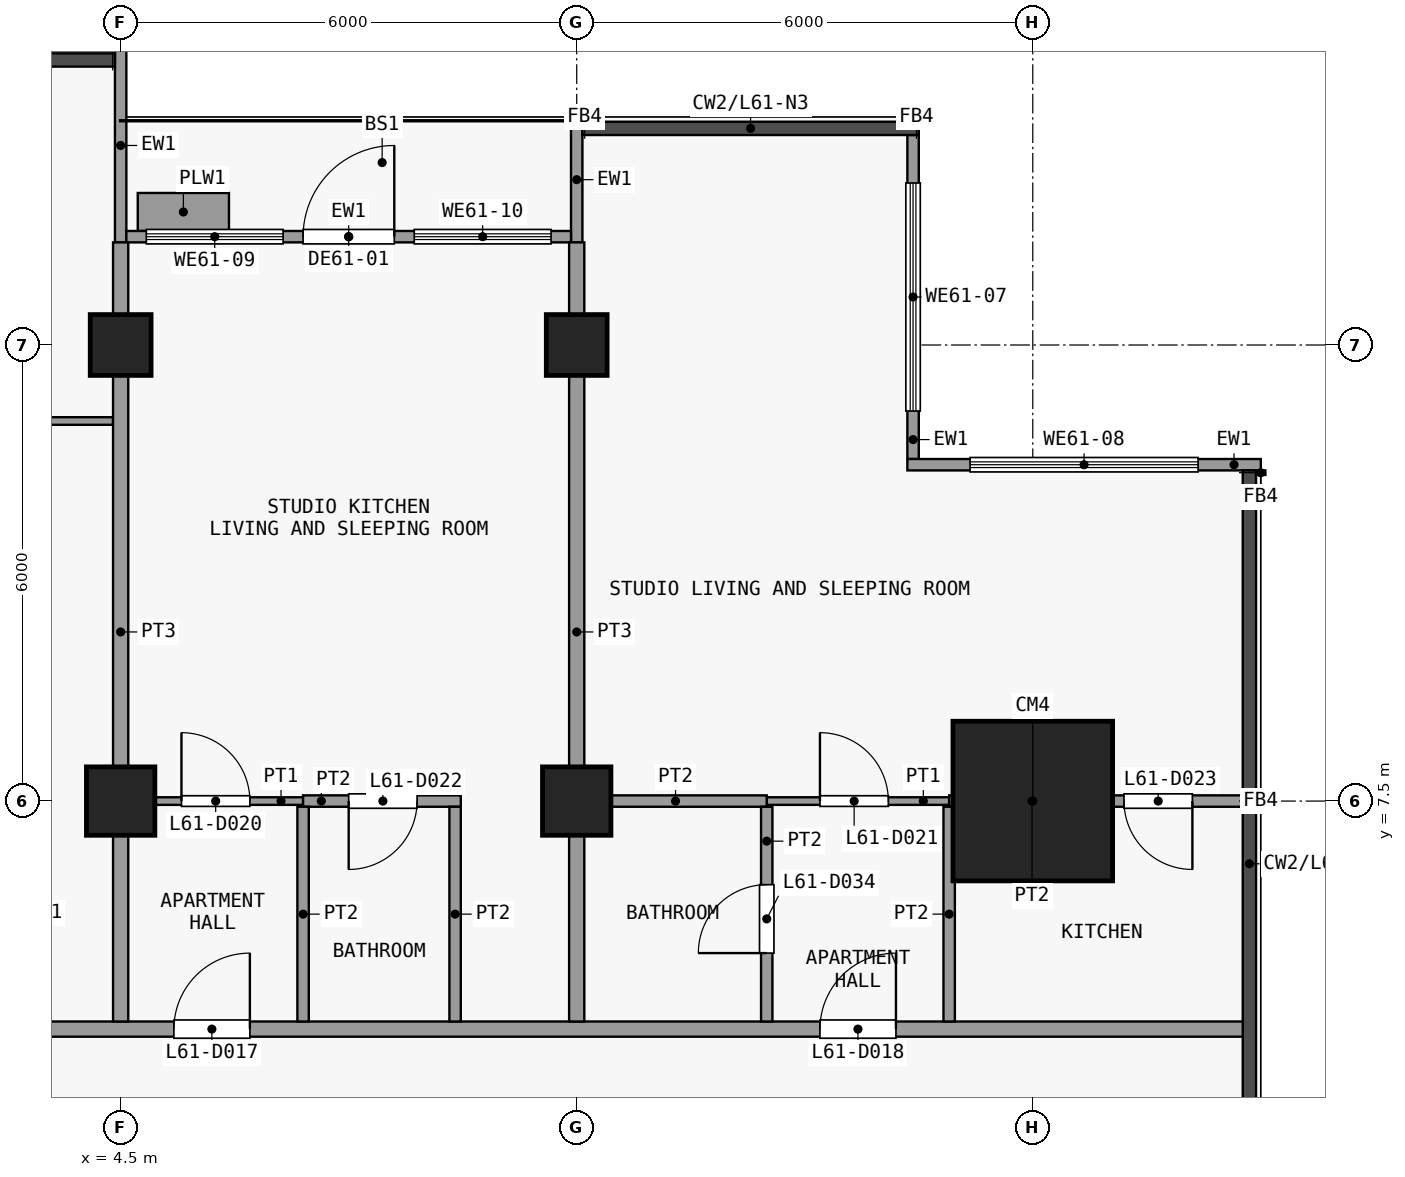
"""IFC4 building model, lengths in metres.
Left out: names, types, materials, properties, quantities, classifications, styles, units other than length and angle.
Written with IfcOpenShell. Run it as: python <this file> out.ifc"""

import sys

from ifc_helpers import new_model, si_unit, direction, frame, frame_2d, origin, origin_2d, place, context, subcontext, project, spatial, rectangle, extrude, element, fill, save


model = new_model("IFC4")
c1 = context("Model", 3, precision=1e-05, world=origin(), true_north=direction((0.0, 1.0)))
c2 = subcontext(c1, "Body", "Model", "MODEL_VIEW")
j1 = project(units=[si_unit("LENGTHUNIT", "METRE"), si_unit("PLANEANGLEUNIT", "RADIAN")], contexts=[c1])
p1 = place(None, origin())
s1 = spatial("IfcSite", under=j1, at=p1, CompositionType="ELEMENT")
p2 = place(p1, origin())
s2 = spatial("IfcBuilding", under=s1, at=p2, CompositionType="ELEMENT")
p3 = place(p2, frame((0.0, 0.0, 241.1)))
s3 = spatial("IfcBuildingStorey", under=s2, at=p3, CompositionType="ELEMENT", Elevation=241.1)
p4 = place(p3, frame((4.5, 7.5, 0.0), z_axis=(0.0, 0.0, 1.0), x_axis=(1.0, 0.0, 0.0)))
e1 = element("IfcColumn", 1, at=p4, inside=s3, PredefinedType="COLUMN", context=c2, shape_type="SweptSolid", body=[
    extrude(rectangle(XDim=0.9, YDim=0.9, at=origin_2d()), origin(), (0.0, 0.0, 1.0), 3.6),
])
p5 = place(p3, frame((4.5, 13.5, 0.0), z_axis=(0.0, 0.0, 1.0), x_axis=(1.0, 0.0, 0.0)))
e2 = element("IfcColumn", 2, at=p5, inside=s3, PredefinedType="COLUMN", context=c2, shape_type="SweptSolid", body=[
    extrude(rectangle(XDim=0.8, YDim=0.8, at=origin_2d()), origin(), (0.0, 0.0, 1.0), 3.6),
])
p6 = place(p3, frame((10.5, 7.5, 0.0), z_axis=(0.0, 0.0, 1.0), x_axis=(1.0, 0.0, 0.0)))
e3 = element("IfcColumn", 3, at=p6, inside=s3, PredefinedType="COLUMN", context=c2, shape_type="SweptSolid", body=[
    extrude(rectangle(XDim=0.9, YDim=0.9, at=origin_2d()), origin(), (0.0, 0.0, 1.0), 3.6),
])
p7 = place(p3, frame((10.5, 13.5, 0.0), z_axis=(0.0, 0.0, 1.0), x_axis=(1.0, 0.0, 0.0)))
e4 = element("IfcColumn", 4, at=p7, inside=s3, PredefinedType="COLUMN", context=c2, shape_type="SweptSolid", body=[
    extrude(rectangle(XDim=0.8, YDim=0.8, at=origin_2d()), origin(), (0.0, 0.0, 1.0), 3.6),
])
p8 = place(p3, frame((16.5, 7.5, 0.0), z_axis=(0.0, 0.0, 1.0), x_axis=(1.0, 0.0, 0.0)))
e5 = element("IfcColumn", 5, at=p8, inside=s3, PredefinedType="COLUMN", context=c2, shape_type="SweptSolid", body=[
    extrude(rectangle(XDim=2.1, YDim=2.1, at=origin_2d()), origin(), (0.0, 0.0, 1.0), 3.6),
])
p9 = place(p3, frame((14.925, 16.262, 0.0), z_axis=(0.0, 0.0, 1.0), x_axis=(0.0, -1.0, 0.0)))
e6 = element("IfcWall", 6, at=p9, inside=s3, PredefinedType="SOLIDWALL", context=c2, shape_type="SweptSolid", body=[
    extrude(rectangle(XDim=4.262, YDim=0.15, at=frame_2d((2.131, 0.0))), origin(), (0.0, 0.0, 1.0), 3.3),
])
p10 = place(p9, frame((0.631, 0.0, 0.9)))
e7 = element("IfcOpeningElement", 7, at=p10, cuts=e6, PredefinedType="OPENING", context=c2, shape_type="SweptSolid", body=[
    extrude(rectangle(XDim=3.0, YDim=2.4, at=frame_2d((1.5, 1.2))), frame((0.0, 0.085, 0.0), z_axis=(0.0, -1.0, 0.0), x_axis=(1.0, 0.0, 0.0)), (0.0, 0.0, 1.0), 0.17),
])
p11 = place(p3, frame((14.85, 11.925, 0.0), z_axis=(0.0, 0.0, 1.0), x_axis=(1.0, 0.0, 0.0)))
e8 = element("IfcWall", 8, at=p11, inside=s3, PredefinedType="SOLIDWALL", context=c2, shape_type="SweptSolid", body=[
    extrude(rectangle(XDim=4.65, YDim=0.15, at=frame_2d((2.325, 0.0))), origin(), (0.0, 0.0, 1.0), 3.3),
])
p12 = place(p11, frame((0.825, 0.0, 0.9)))
e9 = element("IfcOpeningElement", 9, at=p12, cuts=e8, PredefinedType="OPENING", context=c2, shape_type="SweptSolid", body=[
    extrude(rectangle(XDim=3.0, YDim=2.4, at=frame_2d((1.5, 1.2))), frame((0.0, 0.085, 0.0), z_axis=(0.0, -1.0, 0.0), x_axis=(1.0, 0.0, 0.0)), (0.0, 0.0, 1.0), 0.17),
])
p13 = place(p3, frame((4.5, 14.85, 0.0), z_axis=(0.0, 0.0, 1.0), x_axis=(0.0, 1.0, 0.0)))
e10 = element("IfcWall", 10, at=p13, inside=s3, PredefinedType="SOLIDWALL", context=c2, shape_type="SweptSolid", body=[
    extrude(rectangle(XDim=2.55, YDim=0.15, at=frame_2d((1.275, 0.0))), origin(), (0.0, 0.0, 1.0), 3.3),
])
p14 = place(p3, frame((10.5, 14.85, 0.0), z_axis=(0.0, 0.0, 1.0), x_axis=(0.0, 1.0, 0.0)))
e11 = element("IfcWall", 11, at=p14, inside=s3, PredefinedType="SOLIDWALL", context=c2, shape_type="SweptSolid", body=[
    extrude(rectangle(XDim=1.65, YDim=0.15, at=frame_2d((0.825, 0.0))), origin(), (0.0, 0.0, 1.0), 3.3),
])
p15 = place(p3, frame((4.575, 14.925, 0.0), z_axis=(0.0, 0.0, 1.0), x_axis=(1.0, 0.0, 0.0)))
e12 = element("IfcWall", 12, at=p15, inside=s3, PredefinedType="SOLIDWALL", context=c2, shape_type="SweptSolid", body=[
    extrude(rectangle(XDim=5.85, YDim=0.15, at=frame_2d((2.925, 0.0))), origin(), (0.0, 0.0, 1.0), 3.3),
])
p16 = place(p15, frame((2.325, 0.0, 0.0)))
e13 = element("IfcOpeningElement", 13, at=p16, cuts=e12, PredefinedType="OPENING", context=c2, shape_type="SweptSolid", body=[
    extrude(rectangle(XDim=1.2, YDim=2.4, at=frame_2d((0.6, 1.2))), frame((0.0, 0.085, 0.0), z_axis=(0.0, -1.0, 0.0), x_axis=(1.0, 0.0, 0.0)), (0.0, 0.0, 1.0), 0.17),
])
p17 = place(p15, frame((0.262, 0.0, 0.9)))
e14 = element("IfcOpeningElement", 14, at=p17, cuts=e12, PredefinedType="OPENING", context=c2, shape_type="SweptSolid", body=[
    extrude(rectangle(XDim=1.8, YDim=2.1, at=frame_2d((0.9, 1.05))), frame((0.0, 0.085, 0.0), z_axis=(0.0, -1.0, 0.0), x_axis=(1.0, 0.0, 0.0)), (0.0, 0.0, 1.0), 0.17),
])
p18 = place(p15, frame((3.788, 0.0, 0.9)))
e15 = element("IfcOpeningElement", 15, at=p18, cuts=e12, PredefinedType="OPENING", context=c2, shape_type="SweptSolid", body=[
    extrude(rectangle(XDim=1.8, YDim=2.1, at=frame_2d((0.9, 1.05))), frame((0.0, 0.085, 0.0), z_axis=(0.0, -1.0, 0.0), x_axis=(1.0, 0.0, 0.0)), (0.0, 0.0, 1.0), 0.17),
])
p19 = place(p3, frame((4.725, 15.25, 0.0), z_axis=(0.0, 0.0, 1.0), x_axis=(1.0, 0.0, 0.0)))
e16 = element("IfcWall", 16, at=p19, inside=s3, PredefinedType="USERDEFINED", context=c2, shape_type="SweptSolid", body=[
    extrude(rectangle(XDim=1.2, YDim=0.5, at=frame_2d((0.6, 0.0))), origin(), (0.0, 0.0, 1.0), 0.9),
])
p20 = place(p3, frame((-19.35, 4.5, 0.0), z_axis=(0.0, 0.0, 1.0), x_axis=(1.0, 0.0, 0.0)))
e17 = element("IfcWall", 17, at=p20, inside=s3, PredefinedType="PARTITIONING", context=c2, shape_type="SweptSolid", body=[
    extrude(rectangle(XDim=38.7, YDim=0.2, at=frame_2d((19.35, 0.0))), origin(), (0.0, 0.0, 1.0), 3.3),
])
p21 = place(p20, frame((13.05, 0.0, 0.0)))
e18 = element("IfcOpeningElement", 18, at=p21, cuts=e17, PredefinedType="OPENING", context=c2, shape_type="SweptSolid", body=[
    extrude(rectangle(XDim=1.0, YDim=2.1, at=frame_2d((0.5, 1.05))), frame((0.0, 0.11, 0.0), z_axis=(0.0, -1.0, 0.0), x_axis=(1.0, 0.0, 0.0)), (0.0, 0.0, 1.0), 0.22),
])
p22 = place(p20, frame((24.55, 0.0, 0.0)))
e19 = element("IfcOpeningElement", 19, at=p22, cuts=e17, PredefinedType="OPENING", context=c2, shape_type="SweptSolid", body=[
    extrude(rectangle(XDim=1.0, YDim=2.1, at=frame_2d((0.5, 1.05))), frame((0.0, 0.11, 0.0), z_axis=(0.0, -1.0, 0.0), x_axis=(1.0, 0.0, 0.0)), (0.0, 0.0, 1.0), 0.22),
])
p23 = place(p20, frame((33.05, 0.0, 0.0)))
e20 = element("IfcOpeningElement", 20, at=p23, cuts=e17, PredefinedType="OPENING", context=c2, shape_type="SweptSolid", body=[
    extrude(rectangle(XDim=1.0, YDim=2.1, at=frame_2d((0.5, 1.05))), frame((0.0, 0.11, 0.0), z_axis=(0.0, -1.0, 0.0), x_axis=(1.0, 0.0, 0.0)), (0.0, 0.0, 1.0), 0.22),
])
p24 = place(p3, frame((4.6, 7.5, 0.0), z_axis=(0.0, 0.0, 1.0), x_axis=(1.0, 0.0, 0.0)))
e21 = element("IfcWall", 21, at=p24, inside=s3, PredefinedType="PARTITIONING", context=c2, shape_type="SweptSolid", body=[
    extrude(rectangle(XDim=2.3, YDim=0.1, at=frame_2d((1.15, 0.0))), origin(), (0.0, 0.0, 1.0), 3.3),
])
p25 = place(p24, frame((0.7, 0.0, 0.0)))
e22 = element("IfcOpeningElement", 22, at=p25, cuts=e21, PredefinedType="OPENING", context=c2, shape_type="SweptSolid", body=[
    extrude(rectangle(XDim=0.9, YDim=2.1, at=frame_2d((0.45, 1.05))), frame((0.0, 0.06, 0.0), z_axis=(0.0, -1.0, 0.0), x_axis=(1.0, 0.0, 0.0)), (0.0, 0.0, 1.0), 0.12),
])
p26 = place(p3, frame((13.0, 7.5, 0.0), z_axis=(0.0, 0.0, 1.0), x_axis=(1.0, 0.0, 0.0)))
e23 = element("IfcWall", 23, at=p26, inside=s3, PredefinedType="PARTITIONING", context=c2, shape_type="SweptSolid", body=[
    extrude(rectangle(XDim=2.4, YDim=0.1, at=frame_2d((1.2, 0.0))), origin(), (0.0, 0.0, 1.0), 3.3),
])
p27 = place(p26, frame((0.7, 0.0, 0.0)))
e24 = element("IfcOpeningElement", 24, at=p27, cuts=e23, PredefinedType="OPENING", context=c2, shape_type="SweptSolid", body=[
    extrude(rectangle(XDim=0.9, YDim=2.1, at=frame_2d((0.45, 1.05))), frame((0.0, 0.06, 0.0), z_axis=(0.0, -1.0, 0.0), x_axis=(1.0, 0.0, 0.0)), (0.0, 0.0, 1.0), 0.12),
])
p28 = place(p3, frame((6.9, 7.5, 0.0), z_axis=(0.0, 0.0, 1.0), x_axis=(1.0, 0.0, 0.0)))
e25 = element("IfcWall", 25, at=p28, inside=s3, PredefinedType="PARTITIONING", context=c2, shape_type="SweptSolid", body=[
    extrude(rectangle(XDim=2.075, YDim=0.15, at=frame_2d((1.038, 0.0))), origin(), (0.0, 0.0, 1.0), 3.3),
])
p29 = place(p28, frame((0.6, 0.0, 0.0)))
e26 = element("IfcOpeningElement", 26, at=p29, cuts=e25, PredefinedType="OPENING", context=c2, shape_type="SweptSolid", body=[
    extrude(rectangle(XDim=0.9, YDim=2.1, at=frame_2d((0.45, 1.05))), frame((0.0, 0.085, 0.0), z_axis=(0.0, -1.0, 0.0), x_axis=(1.0, 0.0, 0.0)), (0.0, 0.0, 1.0), 0.17),
])
p30 = place(p3, frame((10.6, 7.5, 0.0), z_axis=(0.0, 0.0, 1.0), x_axis=(1.0, 0.0, 0.0)))
e27 = element("IfcWall", 27, at=p30, inside=s3, PredefinedType="PARTITIONING", context=c2, shape_type="SweptSolid", body=[
    extrude(rectangle(XDim=2.4, YDim=0.15, at=frame_2d((1.2, 0.0))), origin(), (0.0, 0.0, 1.0), 3.3),
])
p31 = place(p3, frame((15.4, 7.5, 0.0), z_axis=(0.0, 0.0, 1.0), x_axis=(1.0, 0.0, 0.0)))
e28 = element("IfcWall", 28, at=p31, inside=s3, PredefinedType="PARTITIONING", context=c2, shape_type="SweptSolid", body=[
    extrude(rectangle(XDim=3.863, YDim=0.15, at=frame_2d((1.931, 0.0))), origin(), (0.0, 0.0, 1.0), 3.3),
])
p32 = place(p31, frame((2.3, 0.0, 0.0)))
e29 = element("IfcOpeningElement", 29, at=p32, cuts=e28, PredefinedType="OPENING", context=c2, shape_type="SweptSolid", body=[
    extrude(rectangle(XDim=0.9, YDim=2.1, at=frame_2d((0.45, 1.05))), frame((0.0, 0.085, 0.0), z_axis=(0.0, -1.0, 0.0), x_axis=(1.0, 0.0, 0.0)), (0.0, 0.0, 1.0), 0.17),
])
p33 = place(p3, frame((-4.45, 12.5, 0.0), z_axis=(0.0, 0.0, 1.0), x_axis=(1.0, 0.0, 0.0)))
e30 = element("IfcWall", 30, at=p33, inside=s3, PredefinedType="PARTITIONING", context=c2, shape_type="SweptSolid", body=[
    extrude(rectangle(XDim=8.85, YDim=0.1, at=frame_2d((4.425, 0.0))), origin(), (0.0, 0.0, 1.0), 3.3),
])
p34 = place(p33, frame((4.0, 0.0, 0.0)))
e31 = element("IfcOpeningElement", 31, at=p34, cuts=e30, PredefinedType="OPENING", context=c2, shape_type="SweptSolid", body=[
    extrude(rectangle(XDim=0.9, YDim=2.1, at=frame_2d((0.45, 1.05))), frame((0.0, 0.06, 0.0), z_axis=(0.0, -1.0, 0.0), x_axis=(1.0, 0.0, 0.0)), (0.0, 0.0, 1.0), 0.12),
])
p35 = place(p3, frame((4.5, 4.6, 0.0), z_axis=(0.0, 0.0, 1.0), x_axis=(0.0, 1.0, 0.0)))
e32 = element("IfcWall", 32, at=p35, inside=s3, PredefinedType="PARTITIONING", context=c2, shape_type="SweptSolid", body=[
    extrude(rectangle(XDim=10.25, YDim=0.2, at=frame_2d((5.125, 0.0))), origin(), (0.0, 0.0, 1.0), 3.3),
])
for number, where, z_axis, x_axis in (
    (33, (6.9, 4.6, 0.0), (0.0, 0.0, 1.0), (0.0, 1.0, 0.0)),
    (34, (8.9, 4.6, 0.0), (0.0, 0.0, 1.0), (0.0, 1.0, 0.0)),
):
    element("IfcWall", number, at=place(p3, frame(where, z_axis=z_axis, x_axis=x_axis)), inside=s3, PredefinedType="PARTITIONING", context=c2, shape_type="SweptSolid", body=[
        extrude(rectangle(XDim=2.825, YDim=0.15, at=frame_2d((1.413, 0.0))), origin(), (0.0, 0.0, 1.0), 3.3),
    ])
p36 = place(p3, frame((10.5, 4.6, 0.0), z_axis=(0.0, 0.0, 1.0), x_axis=(0.0, 1.0, 0.0)))
e35 = element("IfcWall", 35, at=p36, inside=s3, PredefinedType="PARTITIONING", context=c2, shape_type="SweptSolid", body=[
    extrude(rectangle(XDim=10.25, YDim=0.2, at=frame_2d((5.125, 0.0))), origin(), (0.0, 0.0, 1.0), 3.3),
])
p37 = place(p3, frame((13.0, 4.6, 0.0), z_axis=(0.0, 0.0, 1.0), x_axis=(0.0, 1.0, 0.0)))
e36 = element("IfcWall", 36, at=p37, inside=s3, PredefinedType="PARTITIONING", context=c2, shape_type="SweptSolid", body=[
    extrude(rectangle(XDim=2.825, YDim=0.15, at=frame_2d((1.413, 0.0))), origin(), (0.0, 0.0, 1.0), 3.3),
])
p38 = place(p37, frame((0.9, 0.0, 0.0)))
e37 = element("IfcOpeningElement", 37, at=p38, cuts=e36, PredefinedType="OPENING", context=c2, shape_type="SweptSolid", body=[
    extrude(rectangle(XDim=0.9, YDim=2.1, at=frame_2d((0.45, 1.05))), frame((0.0, 0.085, 0.0), z_axis=(0.0, -1.0, 0.0), x_axis=(1.0, 0.0, 0.0)), (0.0, 0.0, 1.0), 0.17),
])
p39 = place(p3, frame((15.4, 4.6, 0.0), z_axis=(0.0, 0.0, 1.0), x_axis=(0.0, 1.0, 0.0)))
e38 = element("IfcWall", 38, at=p39, inside=s3, PredefinedType="PARTITIONING", context=c2, shape_type="SweptSolid", body=[
    extrude(rectangle(XDim=2.825, YDim=0.15, at=frame_2d((1.413, 0.0))), origin(), (0.0, 0.0, 1.0), 3.3),
])
p40 = place(p10, origin())
e39 = element("IfcWindow", 39, at=p40, inside=s3, PartitioningType="SINGLE_PANEL", PredefinedType="WINDOW", context=c2, shape_type="SweptSolid", body=[
    extrude(rectangle(XDim=3.0, YDim=2.4, at=frame_2d((1.5, 1.2))), frame((0.0, 0.03, 0.0), z_axis=(0.0, -1.0, 0.0), x_axis=(1.0, 0.0, 0.0)), (0.0, 0.0, 1.0), 0.06),
])
fill(e7, e39)
p41 = place(p12, origin())
e40 = element("IfcWindow", 40, at=p41, inside=s3, PartitioningType="SINGLE_PANEL", PredefinedType="WINDOW", context=c2, shape_type="SweptSolid", body=[
    extrude(rectangle(XDim=3.0, YDim=2.4, at=frame_2d((1.5, 1.2))), frame((0.0, 0.03, 0.0), z_axis=(0.0, -1.0, 0.0), x_axis=(1.0, 0.0, 0.0)), (0.0, 0.0, 1.0), 0.06),
])
fill(e9, e40)
p42 = place(p16, origin())
e41 = element("IfcDoor", 41, at=p42, inside=s3, OperationType="SINGLE_SWING_RIGHT", PredefinedType="DOOR", context=c2, shape_type="SweptSolid", body=[
    extrude(rectangle(XDim=1.2, YDim=2.4, at=frame_2d((0.6, 1.2))), frame((0.0, 0.025, 0.0), z_axis=(0.0, -1.0, 0.0), x_axis=(1.0, 0.0, 0.0)), (0.0, 0.0, 1.0), 0.05),
])
fill(e13, e41)
p43 = place(p17, origin())
e42 = element("IfcWindow", 42, at=p43, inside=s3, PartitioningType="SINGLE_PANEL", PredefinedType="WINDOW", context=c2, shape_type="SweptSolid", body=[
    extrude(rectangle(XDim=1.8, YDim=2.1, at=frame_2d((0.9, 1.05))), frame((0.0, 0.03, 0.0), z_axis=(0.0, -1.0, 0.0), x_axis=(1.0, 0.0, 0.0)), (0.0, 0.0, 1.0), 0.06),
])
fill(e14, e42)
p44 = place(p18, origin())
e43 = element("IfcWindow", 43, at=p44, inside=s3, PartitioningType="SINGLE_PANEL", PredefinedType="WINDOW", context=c2, shape_type="SweptSolid", body=[
    extrude(rectangle(XDim=1.8, YDim=2.1, at=frame_2d((0.9, 1.05))), frame((0.0, 0.03, 0.0), z_axis=(0.0, -1.0, 0.0), x_axis=(1.0, 0.0, 0.0)), (0.0, 0.0, 1.0), 0.06),
])
fill(e15, e43)
p45 = place(p22, origin())
e44 = element("IfcDoor", 44, at=p45, inside=s3, OperationType="SINGLE_SWING_LEFT", PredefinedType="DOOR", context=c2, shape_type="SweptSolid", body=[
    extrude(rectangle(XDim=1.0, YDim=2.1, at=frame_2d((0.5, 1.05))), frame((0.0, 0.025, 0.0), z_axis=(0.0, -1.0, 0.0), x_axis=(1.0, 0.0, 0.0)), (0.0, 0.0, 1.0), 0.05),
])
fill(e19, e44)
p46 = place(p23, origin())
e45 = element("IfcDoor", 45, at=p46, inside=s3, OperationType="SINGLE_SWING_LEFT", PredefinedType="DOOR", context=c2, shape_type="SweptSolid", body=[
    extrude(rectangle(XDim=1.0, YDim=2.1, at=frame_2d((0.5, 1.05))), frame((0.0, 0.025, 0.0), z_axis=(0.0, -1.0, 0.0), x_axis=(1.0, 0.0, 0.0)), (0.0, 0.0, 1.0), 0.05),
])
fill(e20, e45)
p47 = place(p25, origin())
e46 = element("IfcDoor", 46, at=p47, inside=s3, OperationType="SINGLE_SWING_RIGHT", PredefinedType="DOOR", context=c2, shape_type="SweptSolid", body=[
    extrude(rectangle(XDim=0.9, YDim=2.1, at=frame_2d((0.45, 1.05))), frame((0.0, 0.025, 0.0), z_axis=(0.0, -1.0, 0.0), x_axis=(1.0, 0.0, 0.0)), (0.0, 0.0, 1.0), 0.05),
])
fill(e22, e46)
p48 = place(p27, origin())
e47 = element("IfcDoor", 47, at=p48, inside=s3, OperationType="SINGLE_SWING_RIGHT", PredefinedType="DOOR", context=c2, shape_type="SweptSolid", body=[
    extrude(rectangle(XDim=0.9, YDim=2.1, at=frame_2d((0.45, 1.05))), frame((0.0, 0.025, 0.0), z_axis=(0.0, -1.0, 0.0), x_axis=(1.0, 0.0, 0.0)), (0.0, 0.0, 1.0), 0.05),
])
fill(e24, e47)
p49 = place(p29, origin())
e48 = element("IfcDoor", 48, at=p49, inside=s3, OperationType="SINGLE_SWING_LEFT", PredefinedType="DOOR", context=c2, shape_type="SweptSolid", body=[
    extrude(rectangle(XDim=0.9, YDim=2.1, at=frame_2d((0.45, 1.05))), frame((0.0, 0.025, 0.0), z_axis=(0.0, -1.0, 0.0), x_axis=(1.0, 0.0, 0.0)), (0.0, 0.0, 1.0), 0.05),
])
fill(e26, e48)
p50 = place(p32, origin())
e49 = element("IfcDoor", 49, at=p50, inside=s3, OperationType="SINGLE_SWING_RIGHT", PredefinedType="DOOR", context=c2, shape_type="SweptSolid", body=[
    extrude(rectangle(XDim=0.9, YDim=2.1, at=frame_2d((0.45, 1.05))), frame((0.0, 0.025, 0.0), z_axis=(0.0, -1.0, 0.0), x_axis=(1.0, 0.0, 0.0)), (0.0, 0.0, 1.0), 0.05),
])
fill(e29, e49)
p51 = place(p38, origin())
e50 = element("IfcDoor", 50, at=p51, inside=s3, OperationType="SINGLE_SWING_RIGHT", PredefinedType="DOOR", context=c2, shape_type="SweptSolid", body=[
    extrude(rectangle(XDim=0.9, YDim=2.1, at=frame_2d((0.45, 1.05))), frame((0.0, 0.025, 0.0), z_axis=(0.0, -1.0, 0.0), x_axis=(1.0, 0.0, 0.0)), (0.0, 0.0, 1.0), 0.05),
])
fill(e37, e50)
save(model, sys.argv[1])
